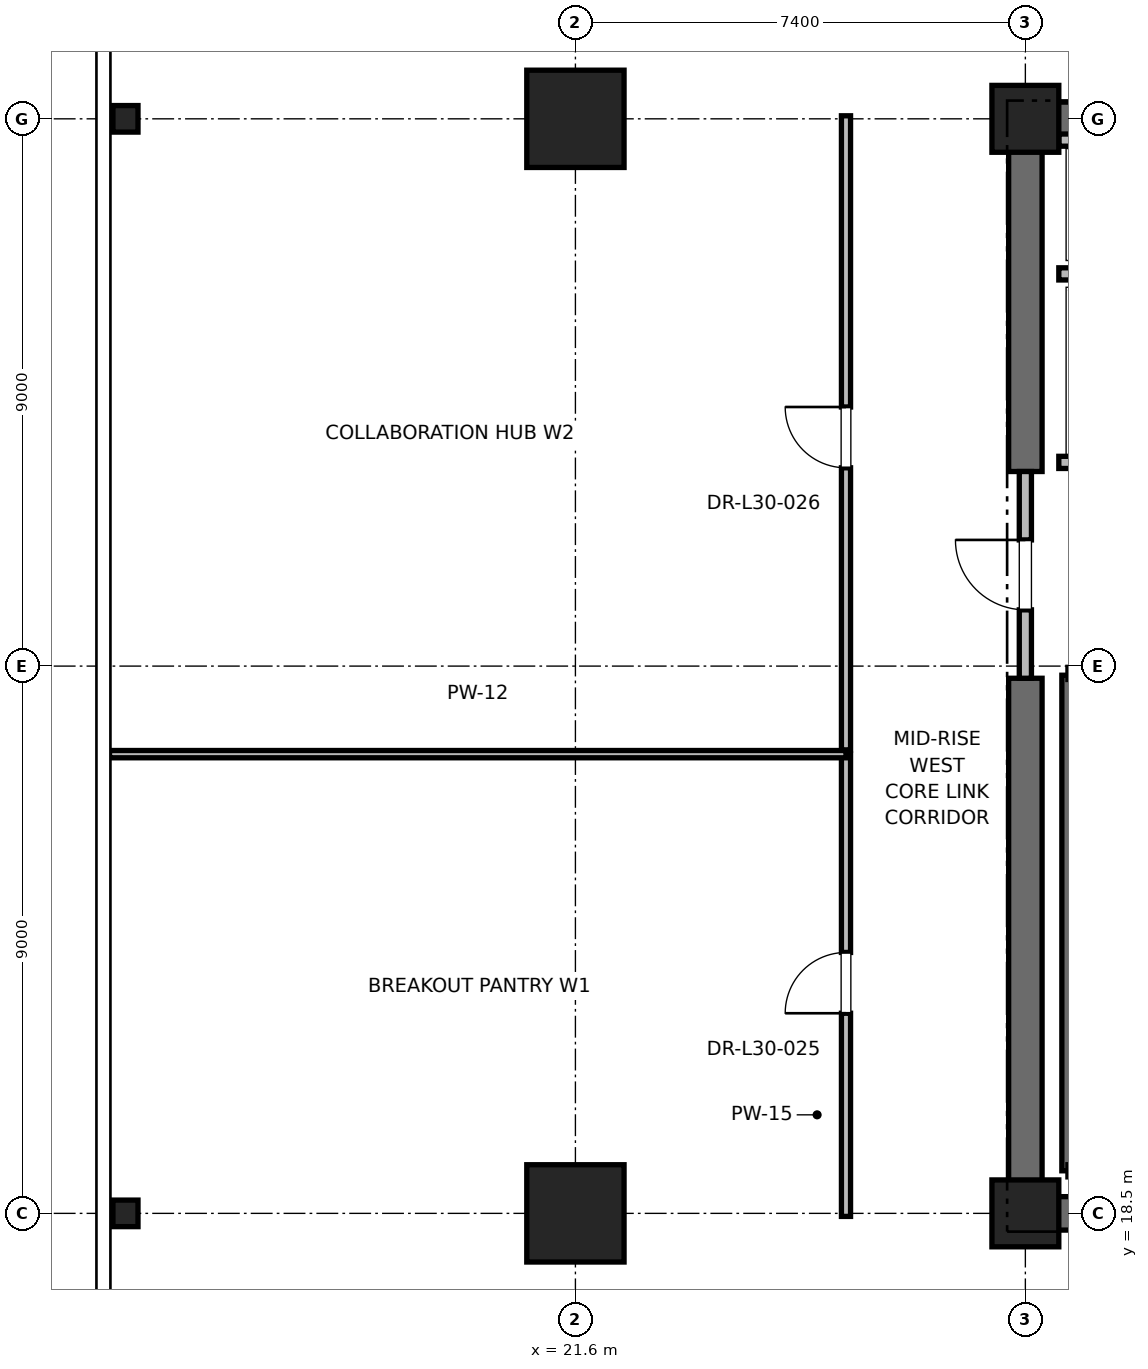
"""IFC4 building model, lengths in metres.
Left out: names, types, materials, properties, quantities, classifications, styles, units other than length and angle.
Written with IfcOpenShell. Run it as: python <this file> out.ifc"""

import sys

from ifc_helpers import new_model, si_unit, direction, frame, frame_2d, origin, origin_2d, place, context, subcontext, project, spatial, rectangle, i_section, extrude, element, fill, save


model = new_model("IFC4")
c1 = context("Model", 3, precision=1e-05, world=origin(), true_north=direction((0.0, 1.0)))
c2 = subcontext(c1, "Body", "Model", "MODEL_VIEW")
j1 = project(units=[si_unit("LENGTHUNIT", "METRE"), si_unit("PLANEANGLEUNIT", "RADIAN")], contexts=[c1])
p1 = place(None, origin())
s1 = spatial("IfcSite", under=j1, at=p1, CompositionType="ELEMENT")
p2 = place(p1, origin())
s2 = spatial("IfcBuilding", under=s1, at=p2, CompositionType="ELEMENT")
p3 = place(p2, frame((0.0, 0.0, 132.4)))
s3 = spatial("IfcBuildingStorey", under=s2, at=p3, CompositionType="ELEMENT", Elevation=132.4)
for number, where, z_axis, x_axis in (
    (1, (21.6, 18.5, 0.0), (0.0, 0.0, 1.0), (1.0, 0.0, 0.0)),
    (2, (21.6, 36.5, 0.0), (0.0, 0.0, 1.0), (1.0, 0.0, 0.0)),
):
    element("IfcColumn", number, at=place(p3, frame(where, z_axis=z_axis, x_axis=x_axis)), inside=s3, PredefinedType="COLUMN", context=c2, shape_type="SweptSolid", body=[
        extrude(rectangle(XDim=1.6, YDim=1.6, at=origin_2d()), origin(), (0.0, 0.0, 1.0), 4.0),
    ])
for number, where, z_axis, x_axis in (
    (3, (14.2, 18.5, 0.0), (0.0, 0.0, 1.0), (1.0, 0.0, 0.0)),
    (4, (14.2, 36.5, 0.0), (0.0, 0.0, 1.0), (1.0, 0.0, 0.0)),
):
    element("IfcColumn", number, at=place(p3, frame(where, z_axis=z_axis, x_axis=x_axis)), inside=s3, PredefinedType="COLUMN", context=c2, shape_type="SweptSolid", body=[
        extrude(i_section(OverallWidth=0.412, OverallDepth=0.437, WebThickness=0.036, FlangeThickness=0.058, FilletRadius=0.015, at=origin_2d()), origin(), (0.0, 0.0, 1.0), 4.0),
    ])
for number, where, z_axis, x_axis in (
    (5, (29.0, 18.5, 0.0), (0.0, 0.0, 1.0), (1.0, 0.0, 0.0)),
    (6, (29.0, 36.5, 0.0), (0.0, 0.0, 1.0), (1.0, 0.0, 0.0)),
):
    element("IfcColumn", number, at=place(p3, frame(where, z_axis=z_axis, x_axis=x_axis)), inside=s3, PredefinedType="PILASTER", context=c2, shape_type="SweptSolid", body=[
        extrude(rectangle(XDim=1.1, YDim=1.1, at=origin_2d()), origin(), (0.0, 0.0, 1.0), 4.0),
    ])
p4 = place(p3, frame((29.0, 18.5, 0.0), z_axis=(0.0, 0.0, 1.0), x_axis=(1.0, 0.0, 0.0)))
e7 = element("IfcWall", 7, at=p4, inside=s3, PredefinedType="SHEAR", context=c2, shape_type="SweptSolid", body=[
    extrude(rectangle(XDim=9.2, YDim=0.55, at=frame_2d((4.6, 0.0))), origin(), (0.0, 0.0, 1.0), 3.775),
])
p5 = place(p3, frame((29.0, 36.5, 0.0), z_axis=(0.0, 0.0, 1.0), x_axis=(1.0, 0.0, 0.0)))
e8 = element("IfcWall", 8, at=p5, inside=s3, PredefinedType="SHEAR", context=c2, shape_type="SweptSolid", body=[
    extrude(rectangle(XDim=5.8, YDim=0.55, at=frame_2d((2.9, 0.0))), origin(), (0.0, 0.0, 1.0), 3.775),
])
p6 = place(p3, frame((29.0, 18.5, 0.0), z_axis=(0.0, 0.0, 1.0), x_axis=(0.0, 1.0, 0.0)))
e9 = element("IfcWall", 9, at=p6, inside=s3, PredefinedType="SHEAR", context=c2, shape_type="SweptSolid", body=[
    extrude(rectangle(XDim=8.8, YDim=0.55, at=frame_2d((4.4, 0.0))), origin(), (0.0, 0.0, 1.0), 3.775),
])
p7 = place(p3, frame((29.0, 30.7, 0.0), z_axis=(0.0, 0.0, 1.0), x_axis=(0.0, 1.0, 0.0)))
e10 = element("IfcWall", 10, at=p7, inside=s3, PredefinedType="SHEAR", context=c2, shape_type="SweptSolid", body=[
    extrude(rectangle(XDim=5.8, YDim=0.55, at=frame_2d((2.9, 0.0))), origin(), (0.0, 0.0, 1.0), 3.775),
])
p8 = place(p3, frame((29.7, 19.2, 0.0), z_axis=(0.0, 0.0, 1.0), x_axis=(0.0, 1.0, 0.0)))
e11 = element("IfcWall", 11, at=p8, inside=s3, PredefinedType="SOLIDWALL", context=c2, shape_type="SweptSolid", body=[
    extrude(rectangle(XDim=8.15, YDim=0.2, at=frame_2d((4.075, 0.0))), origin(), (0.0, 0.0, 1.0), 3.775),
])
p9 = place(p3, frame((29.0, 27.3, 0.0), z_axis=(0.0, 0.0, 1.0), x_axis=(0.0, 1.0, 0.0)))
e12 = element("IfcWall", 12, at=p9, inside=s3, PredefinedType="PARTITIONING", context=c2, shape_type="SweptSolid", body=[
    extrude(rectangle(XDim=3.4, YDim=0.2, at=frame_2d((1.7, 0.0))), origin(), (0.0, 0.0, 1.0), 2.755),
])
p10 = place(p9, frame((1.125, 0.0, 0.0)))
e13 = element("IfcOpeningElement", 13, at=p10, cuts=e12, PredefinedType="OPENING", context=c2, shape_type="SweptSolid", body=[
    extrude(rectangle(XDim=1.15, YDim=2.2, at=frame_2d((0.575, 1.1))), frame((0.0, 0.1, 0.0), z_axis=(0.0, -1.0, 0.0), x_axis=(1.0, 0.0, 0.0)), (0.0, 0.0, 1.0), 0.2),
])
p11 = place(p3, frame((29.55, 30.85, 0.0), z_axis=(0.0, 0.0, 1.0), x_axis=(1.0, 0.0, 0.0)))
e14 = element("IfcWall", 14, at=p11, inside=s3, PredefinedType="SOLIDWALL", context=c2, shape_type="SweptSolid", body=[
    extrude(rectangle(XDim=2.6, YDim=0.2, at=frame_2d((1.3, 0.0))), origin(), (0.0, 0.0, 1.0), 2.755),
])
p12 = place(p11, frame((0.75, 0.0, 0.0)))
e15 = element("IfcOpeningElement", 15, at=p12, cuts=e14, PredefinedType="OPENING", context=c2, shape_type="SweptSolid", body=[
    extrude(rectangle(XDim=1.1, YDim=2.2, at=frame_2d((0.55, 1.1))), frame((0.0, 0.1, 0.0), z_axis=(0.0, -1.0, 0.0), x_axis=(1.0, 0.0, 0.0)), (0.0, 0.0, 1.0), 0.2),
])
p13 = place(p3, frame((29.55, 33.95, 0.0), z_axis=(0.0, 0.0, 1.0), x_axis=(1.0, 0.0, 0.0)))
e16 = element("IfcWall", 16, at=p13, inside=s3, PredefinedType="SOLIDWALL", context=c2, shape_type="SweptSolid", body=[
    extrude(rectangle(XDim=2.8, YDim=0.2, at=frame_2d((1.4, 0.0))), origin(), (0.0, 0.0, 1.0), 3.775),
])
p14 = place(p3, frame((32.35, 36.15, 0.0), z_axis=(0.0, 0.0, 1.0), x_axis=(-1.0, 0.0, 0.0)))
e17 = element("IfcWall", 17, at=p14, inside=s3, PredefinedType="SOLIDWALL", context=c2, shape_type="SweptSolid", body=[
    extrude(rectangle(XDim=2.8, YDim=0.2, at=frame_2d((1.4, 0.0))), origin(), (0.0, 0.0, 1.0), 2.985),
])
p15 = place(p3, frame((26.05, 18.45, 0.0), z_axis=(0.0, 0.0, 1.0), x_axis=(0.0, 1.0, 0.0)))
e18 = element("IfcWall", 18, at=p15, inside=s3, PredefinedType="PARTITIONING", context=c2, shape_type="SweptSolid", body=[
    extrude(rectangle(XDim=7.602, YDim=0.15, at=frame_2d((3.801, 0.0))), origin(), (0.0, 0.0, 1.0), 2.85),
])
p16 = place(p15, frame((3.341, 0.0, 0.0)))
e19 = element("IfcOpeningElement", 19, at=p16, cuts=e18, PredefinedType="OPENING", context=c2, shape_type="SweptSolid", body=[
    extrude(rectangle(XDim=1.0, YDim=2.15, at=frame_2d((0.5, 1.075))), frame((0.0, 0.075, 0.0), z_axis=(0.0, -1.0, 0.0), x_axis=(1.0, 0.0, 0.0)), (0.0, 0.0, 1.0), 0.15),
])
p17 = place(p3, frame((13.938, 26.052, 0.0), z_axis=(0.0, 0.0, 1.0), x_axis=(1.0, 0.0, 0.0)))
e20 = element("IfcWall", 20, at=p17, inside=s3, PredefinedType="PARTITIONING", context=c2, shape_type="SweptSolid", body=[
    extrude(rectangle(XDim=12.113, YDim=0.12, at=frame_2d((6.056, 0.0))), origin(), (0.0, 0.0, 1.0), 2.85),
])
p18 = place(p3, frame((26.05, 26.122, 0.0), z_axis=(0.0, 0.0, 1.0), x_axis=(0.0, 1.0, 0.0)))
e21 = element("IfcWall", 21, at=p18, inside=s3, PredefinedType="PARTITIONING", context=c2, shape_type="SweptSolid", body=[
    extrude(rectangle(XDim=10.428, YDim=0.15, at=frame_2d((5.214, 0.0))), origin(), (0.0, 0.0, 1.0), 2.85),
])
p19 = place(p18, frame((4.639, 0.0, 0.0)))
e22 = element("IfcOpeningElement", 22, at=p19, cuts=e21, PredefinedType="OPENING", context=c2, shape_type="SweptSolid", body=[
    extrude(rectangle(XDim=1.0, YDim=2.15, at=frame_2d((0.5, 1.075))), frame((0.0, 0.075, 0.0), z_axis=(0.0, -1.0, 0.0), x_axis=(1.0, 0.0, 0.0)), (0.0, 0.0, 1.0), 0.15),
])
p20 = place(p10, origin())
e23 = element("IfcDoor", 23, at=p20, inside=s3, OperationType="SINGLE_SWING_RIGHT", PredefinedType="DOOR", context=c2, shape_type="SweptSolid", body=[
    extrude(rectangle(XDim=1.15, YDim=2.2, at=frame_2d((0.575, 1.1))), frame((0.0, 0.025, 0.0), z_axis=(0.0, -1.0, 0.0), x_axis=(1.0, 0.0, 0.0)), (0.0, 0.0, 1.0), 0.05),
])
fill(e13, e23)
p21 = place(p16, origin())
e24 = element("IfcDoor", 24, at=p21, inside=s3, OperationType="SINGLE_SWING_LEFT", PredefinedType="DOOR", context=c2, shape_type="SweptSolid", body=[
    extrude(rectangle(XDim=1.0, YDim=2.15, at=frame_2d((0.5, 1.075))), frame((0.0, 0.025, 0.0), z_axis=(0.0, -1.0, 0.0), x_axis=(1.0, 0.0, 0.0)), (0.0, 0.0, 1.0), 0.05),
])
fill(e19, e24)
p22 = place(p19, origin())
e25 = element("IfcDoor", 25, at=p22, inside=s3, OperationType="SINGLE_SWING_RIGHT", PredefinedType="DOOR", context=c2, shape_type="SweptSolid", body=[
    extrude(rectangle(XDim=1.0, YDim=2.15, at=frame_2d((0.5, 1.075))), frame((0.0, 0.025, 0.0), z_axis=(0.0, -1.0, 0.0), x_axis=(1.0, 0.0, 0.0)), (0.0, 0.0, 1.0), 0.05),
])
fill(e22, e25)
save(model, sys.argv[1])
